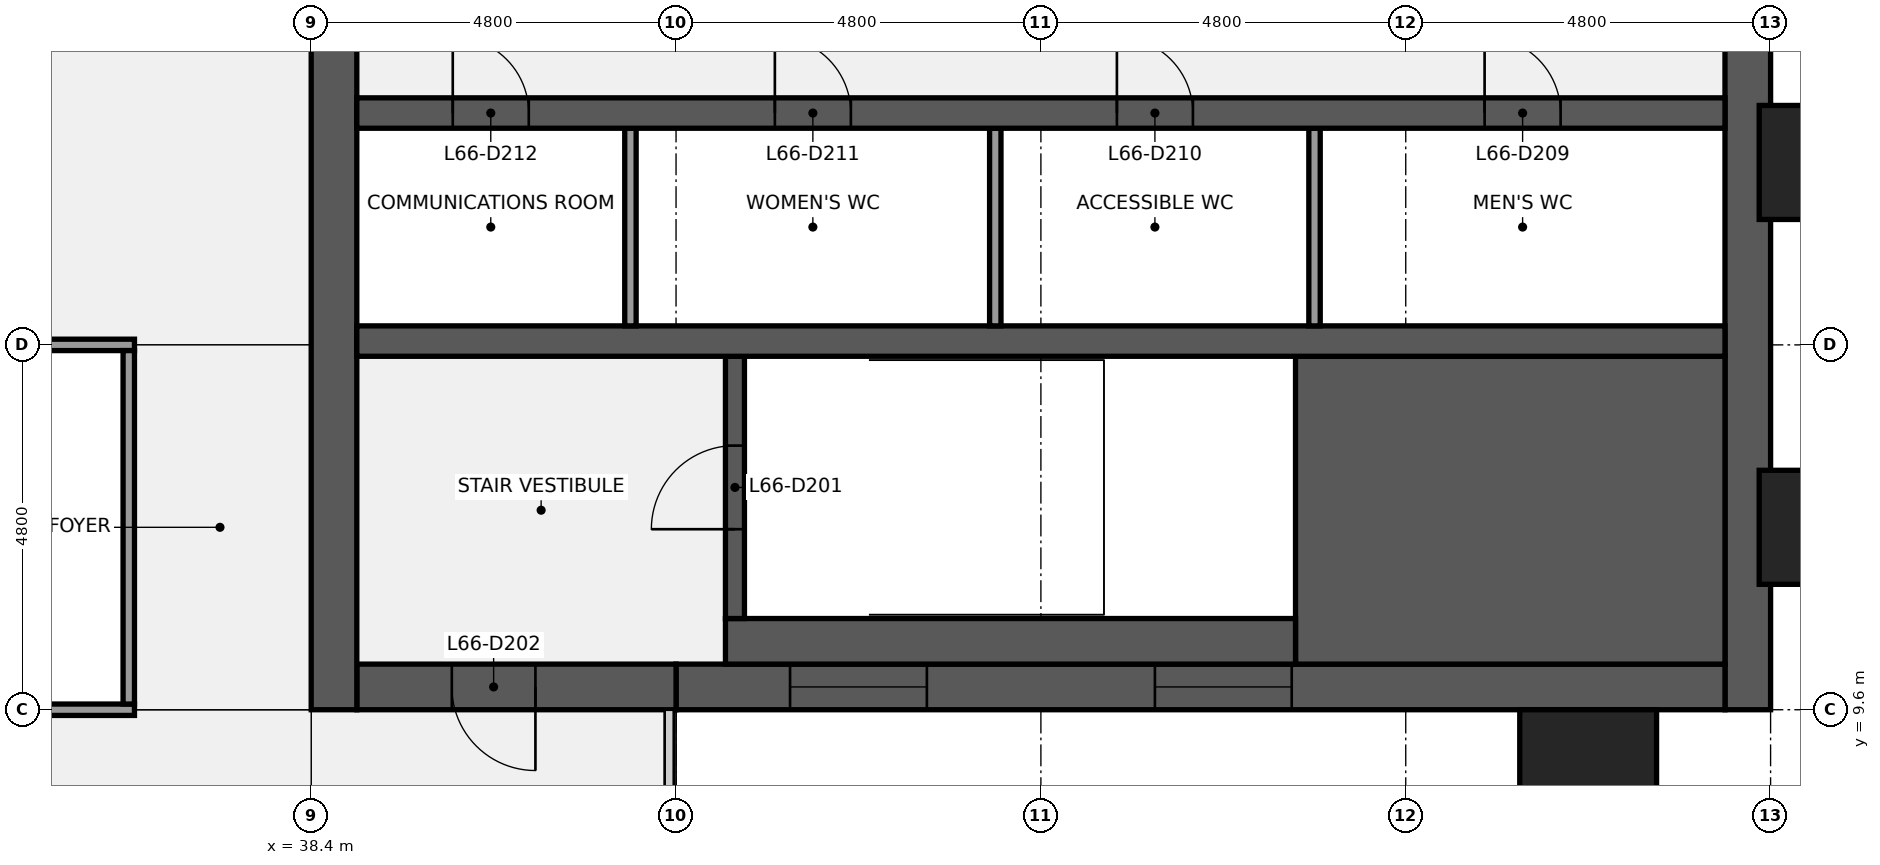
"""IFC4 building model, lengths in metres.
Left out: names, types, materials, properties, quantities, classifications, styles, units other than length and angle.
Written with IfcOpenShell. Run it as: python <this file> out.ifc"""

import sys

from ifc_helpers import new_model, si_unit, direction, frame, frame_2d, origin, origin_2d, place, context, subcontext, project, spatial, rectangle, extrude, element, fill, save


model = new_model("IFC4")
c1 = context("Model", 3, precision=1e-05, world=origin(), true_north=direction((0.0, 1.0)))
c2 = subcontext(c1, "Body", "Model", "MODEL_VIEW")
j1 = project(units=[si_unit("LENGTHUNIT", "METRE"), si_unit("PLANEANGLEUNIT", "RADIAN")], contexts=[c1])
p1 = place(None, origin())
s1 = spatial("IfcSite", under=j1, at=p1, CompositionType="ELEMENT")
p2 = place(p1, origin())
s2 = spatial("IfcBuilding", under=s1, at=p2, CompositionType="ELEMENT")
p3 = place(p2, frame((0.0, 0.0, 302.3)))
s3 = spatial("IfcBuildingStorey", under=s2, at=p3, CompositionType="ELEMENT", Elevation=302.3)
p4 = place(p3, frame((57.3, 38.4, 0.0), z_axis=(0.0, 0.0, 1.0), x_axis=(0.0, -1.0, 0.0)))
e1 = element("IfcWall", 1, at=p4, inside=s3, PredefinedType="SHEAR", context=c2, shape_type="SweptSolid", body=[
    extrude(rectangle(XDim=28.8, YDim=0.6, at=frame_2d((14.4, 0.0))), origin(), (0.0, 0.0, 1.0), 3.84),
])
p5 = place(p4, frame((18.45, 0.0, 0.9)))
e2 = element("IfcOpeningElement", 2, at=p5, cuts=e1, PredefinedType="OPENING", context=c2, shape_type="SweptSolid", body=[
    extrude(rectangle(XDim=1.5, YDim=1.5, at=frame_2d((0.75, 0.75))), frame((0.0, 0.31, 0.0), z_axis=(0.0, -1.0, 0.0), x_axis=(1.0, 0.0, 0.0)), (0.0, 0.0, 1.0), 0.62),
])
p6 = place(p4, frame((8.85, 0.0, 0.9)))
e3 = element("IfcOpeningElement", 3, at=p6, cuts=e1, PredefinedType="OPENING", context=c2, shape_type="SweptSolid", body=[
    extrude(rectangle(XDim=1.5, YDim=1.5, at=frame_2d((0.75, 0.75))), frame((0.0, 0.31, 0.0), z_axis=(0.0, -1.0, 0.0), x_axis=(1.0, 0.0, 0.0)), (0.0, 0.0, 1.0), 0.62),
])
p7 = place(p3, frame((57.0, 9.9, 0.0), z_axis=(0.0, 0.0, 1.0), x_axis=(-1.0, 0.0, 0.0)))
e4 = element("IfcWall", 4, at=p7, inside=s3, PredefinedType="SHEAR", context=c2, shape_type="SweptSolid", body=[
    extrude(rectangle(XDim=13.8, YDim=0.6, at=frame_2d((6.9, 0.0))), origin(), (0.0, 0.0, 1.0), 3.84),
])
p8 = place(p7, frame((5.7, 0.0, 0.9)))
e5 = element("IfcOpeningElement", 5, at=p8, cuts=e4, PredefinedType="OPENING", context=c2, shape_type="SweptSolid", body=[
    extrude(rectangle(XDim=1.8, YDim=1.5, at=frame_2d((0.9, 0.75))), frame((0.0, 0.31, 0.0), z_axis=(0.0, -1.0, 0.0), x_axis=(1.0, 0.0, 0.0)), (0.0, 0.0, 1.0), 0.62),
])
p9 = place(p7, frame((10.5, 0.0, 0.9)))
e6 = element("IfcOpeningElement", 6, at=p9, cuts=e4, PredefinedType="OPENING", context=c2, shape_type="SweptSolid", body=[
    extrude(rectangle(XDim=1.8, YDim=1.5, at=frame_2d((0.9, 0.75))), frame((0.0, 0.31, 0.0), z_axis=(0.0, -1.0, 0.0), x_axis=(1.0, 0.0, 0.0)), (0.0, 0.0, 1.0), 0.62),
])
p10 = place(p3, frame((43.2, 9.9, 0.0), z_axis=(0.0, 0.0, 1.0), x_axis=(-1.0, 0.0, 0.0)))
e7 = element("IfcWall", 7, at=p10, inside=s3, PredefinedType="SHEAR", context=c2, shape_type="SweptSolid", body=[
    extrude(rectangle(XDim=4.2, YDim=0.6, at=frame_2d((2.1, 0.0))), origin(), (0.0, 0.0, 1.0), 3.84),
])
p11 = place(p10, frame((1.85, 0.0, 0.0)))
e8 = element("IfcOpeningElement", 8, at=p11, cuts=e7, PredefinedType="OPENING", context=c2, shape_type="SweptSolid", body=[
    extrude(rectangle(XDim=1.1, YDim=2.1, at=frame_2d((0.55, 1.05))), frame((0.0, 0.31, 0.0), z_axis=(0.0, -1.0, 0.0), x_axis=(1.0, 0.0, 0.0)), (0.0, 0.0, 1.0), 0.62),
])
p12 = place(p3, frame((38.7, 9.6, 0.0), z_axis=(0.0, 0.0, 1.0), x_axis=(0.0, 1.0, 0.0)))
e9 = element("IfcWall", 9, at=p12, inside=s3, PredefinedType="SHEAR", context=c2, shape_type="SweptSolid", body=[
    extrude(rectangle(XDim=28.8, YDim=0.6, at=frame_2d((14.4, 0.0))), origin(), (0.0, 0.0, 1.0), 3.84),
])
p13 = place(p12, frame((8.7, 0.0, 0.0)))
e10 = element("IfcOpeningElement", 10, at=p13, cuts=e9, PredefinedType="OPENING", context=c2, shape_type="SweptSolid", body=[
    extrude(rectangle(XDim=1.8, YDim=2.1, at=frame_2d((0.9, 1.05))), frame((0.0, 0.31, 0.0), z_axis=(0.0, -1.0, 0.0), x_axis=(1.0, 0.0, 0.0)), (0.0, 0.0, 1.0), 0.62),
])
p14 = place(p12, frame((18.3, 0.0, 0.0)))
e11 = element("IfcOpeningElement", 11, at=p14, cuts=e9, PredefinedType="OPENING", context=c2, shape_type="SweptSolid", body=[
    extrude(rectangle(XDim=1.8, YDim=2.1, at=frame_2d((0.9, 1.05))), frame((0.0, 0.31, 0.0), z_axis=(0.0, -1.0, 0.0), x_axis=(1.0, 0.0, 0.0)), (0.0, 0.0, 1.0), 0.62),
])
p15 = place(p3, frame((51.35, 12.225, 0.0), z_axis=(0.0, 0.0, 1.0), x_axis=(1.0, 0.0, 0.0)))
e12 = element("IfcWall", 12, at=p15, inside=s3, PredefinedType="SHEAR", context=c2, shape_type="SweptSolid", body=[
    extrude(rectangle(XDim=5.65, YDim=4.05, at=frame_2d((2.825, 0.0))), origin(), (0.0, 0.0, 1.0), 3.84),
])
p16 = place(p3, frame((43.85, 10.5, 0.0), z_axis=(0.0, 0.0, 1.0), x_axis=(1.0, 0.0, 0.0)))
e13 = element("IfcWall", 13, at=p16, inside=s3, PredefinedType="SHEAR", context=c2, shape_type="SweptSolid", body=[
    extrude(rectangle(XDim=7.5, YDim=0.6, at=frame_2d((3.75, 0.0))), origin(), (0.0, 0.0, 1.0), 3.84),
])
p17 = place(p3, frame((43.975, 10.8, 0.0), z_axis=(0.0, 0.0, 1.0), x_axis=(0.0, 1.0, 0.0)))
e14 = element("IfcWall", 14, at=p17, inside=s3, PredefinedType="SHEAR", context=c2, shape_type="SweptSolid", body=[
    extrude(rectangle(XDim=3.45, YDim=0.25, at=frame_2d((1.725, 0.0))), origin(), (0.0, 0.0, 1.0), 3.84),
])
p18 = place(p17, frame((1.175, 0.0, 0.0)))
e15 = element("IfcOpeningElement", 15, at=p18, cuts=e14, PredefinedType="OPENING", context=c2, shape_type="SweptSolid", body=[
    extrude(rectangle(XDim=1.1, YDim=2.1, at=frame_2d((0.55, 1.05))), frame((0.0, 0.135, 0.0), z_axis=(0.0, -1.0, 0.0), x_axis=(1.0, 0.0, 0.0)), (0.0, 0.0, 1.0), 0.27),
])
p19 = place(p3, frame((39.0, 14.45, 0.0), z_axis=(0.0, 0.0, 1.0), x_axis=(1.0, 0.0, 0.0)))
e16 = element("IfcWall", 16, at=p19, inside=s3, PredefinedType="SHEAR", context=c2, shape_type="SweptSolid", body=[
    extrude(rectangle(XDim=18.0, YDim=0.4, at=frame_2d((9.0, 0.0))), origin(), (0.0, 0.0, 1.0), 3.84),
])
for number, where, z_axis, x_axis in (
    (17, (51.6, 14.65, 0.0), (0.0, 0.0, 1.0), (0.0, 1.0, 0.0)),
    (18, (47.4, 14.65, 0.0), (0.0, 0.0, 1.0), (0.0, 1.0, 0.0)),
    (19, (42.6, 14.65, 0.0), (0.0, 0.0, 1.0), (0.0, 1.0, 0.0)),
):
    element("IfcWall", number, at=place(p3, frame(where, z_axis=z_axis, x_axis=x_axis)), inside=s3, PredefinedType="PARTITIONING", context=c2, shape_type="SweptSolid", body=[
        extrude(rectangle(XDim=2.6, YDim=0.15, at=frame_2d((1.3, 0.0))), origin(), (0.0, 0.0, 1.0), 3.84),
    ])
p20 = place(p3, frame((39.0, 17.45, 0.0), z_axis=(0.0, 0.0, 1.0), x_axis=(1.0, 0.0, 0.0)))
e20 = element("IfcWall", 20, at=p20, inside=s3, PredefinedType="SHEAR", context=c2, shape_type="SweptSolid", body=[
    extrude(rectangle(XDim=18.0, YDim=0.4, at=frame_2d((9.0, 0.0))), origin(), (0.0, 0.0, 1.0), 3.84),
])
p21 = place(p20, frame((14.837, 0.0, 0.0)))
e21 = element("IfcOpeningElement", 21, at=p21, cuts=e20, PredefinedType="OPENING", context=c2, shape_type="SweptSolid", body=[
    extrude(rectangle(XDim=1.0, YDim=2.1, at=frame_2d((0.5, 1.05))), frame((0.0, 0.21, 0.0), z_axis=(0.0, -1.0, 0.0), x_axis=(1.0, 0.0, 0.0)), (0.0, 0.0, 1.0), 0.42),
])
p22 = place(p20, frame((10.0, 0.0, 0.0)))
e22 = element("IfcOpeningElement", 22, at=p22, cuts=e20, PredefinedType="OPENING", context=c2, shape_type="SweptSolid", body=[
    extrude(rectangle(XDim=1.0, YDim=2.1, at=frame_2d((0.5, 1.05))), frame((0.0, 0.21, 0.0), z_axis=(0.0, -1.0, 0.0), x_axis=(1.0, 0.0, 0.0)), (0.0, 0.0, 1.0), 0.42),
])
p23 = place(p20, frame((5.5, 0.0, 0.0)))
e23 = element("IfcOpeningElement", 23, at=p23, cuts=e20, PredefinedType="OPENING", context=c2, shape_type="SweptSolid", body=[
    extrude(rectangle(XDim=1.0, YDim=2.1, at=frame_2d((0.5, 1.05))), frame((0.0, 0.21, 0.0), z_axis=(0.0, -1.0, 0.0), x_axis=(1.0, 0.0, 0.0)), (0.0, 0.0, 1.0), 0.42),
])
p24 = place(p20, frame((1.262, 0.0, 0.0)))
e24 = element("IfcOpeningElement", 24, at=p24, cuts=e20, PredefinedType="OPENING", context=c2, shape_type="SweptSolid", body=[
    extrude(rectangle(XDim=1.0, YDim=2.1, at=frame_2d((0.5, 1.05))), frame((0.0, 0.21, 0.0), z_axis=(0.0, -1.0, 0.0), x_axis=(1.0, 0.0, 0.0)), (0.0, 0.0, 1.0), 0.42),
])
p25 = place(p3, frame((21.525, 9.6, 0.0), z_axis=(0.0, 0.0, 1.0), x_axis=(1.0, 0.0, 0.0)))
e25 = element("IfcWall", 25, at=p25, inside=s3, PredefinedType="PARTITIONING", context=c2, shape_type="SweptSolid", body=[
    extrude(rectangle(XDim=14.55, YDim=0.15, at=frame_2d((7.275, 0.0))), origin(), (0.0, 0.0, 1.0), 2.87),
])
p26 = place(p25, frame((3.175, 0.0, 0.0)))
e26 = element("IfcOpeningElement", 26, at=p26, cuts=e25, PredefinedType="OPENING", context=c2, shape_type="SweptSolid", body=[
    extrude(rectangle(XDim=1.0, YDim=2.1, at=frame_2d((0.5, 1.05))), frame((0.0, 0.085, 0.0), z_axis=(0.0, -1.0, 0.0), x_axis=(1.0, 0.0, 0.0)), (0.0, 0.0, 1.0), 0.17),
])
p27 = place(p25, frame((10.375, 0.0, 0.0)))
e27 = element("IfcOpeningElement", 27, at=p27, cuts=e25, PredefinedType="OPENING", context=c2, shape_type="SweptSolid", body=[
    extrude(rectangle(XDim=1.0, YDim=2.1, at=frame_2d((0.5, 1.05))), frame((0.0, 0.085, 0.0), z_axis=(0.0, -1.0, 0.0), x_axis=(1.0, 0.0, 0.0)), (0.0, 0.0, 1.0), 0.17),
])
p28 = place(p3, frame((31.275, 14.4, 0.0), z_axis=(0.0, 0.0, 1.0), x_axis=(1.0, 0.0, 0.0)))
e28 = element("IfcWall", 28, at=p28, inside=s3, PredefinedType="PARTITIONING", context=c2, shape_type="SweptSolid", body=[
    extrude(rectangle(XDim=4.8, YDim=0.15, at=frame_2d((2.4, 0.0))), origin(), (0.0, 0.0, 1.0), 2.87),
])
p29 = place(p3, frame((36.0, 9.675, 0.0), z_axis=(0.0, 0.0, 1.0), x_axis=(0.0, 1.0, 0.0)))
e29 = element("IfcWall", 29, at=p29, inside=s3, PredefinedType="PARTITIONING", context=c2, shape_type="SweptSolid", body=[
    extrude(rectangle(XDim=4.65, YDim=0.15, at=frame_2d((2.325, 0.0))), origin(), (0.0, 0.0, 1.0), 2.87),
])
for number, where, z_axis, x_axis in (
    (30, (55.2, 8.85, 0.0), (0.0, 0.0, 1.0), (1.0, 0.0, 0.0)),
    (31, (58.35, 12.0, 0.0), (0.0, 0.0, 1.0), (0.0, 1.0, 0.0)),
    (32, (58.35, 16.8, 0.0), (0.0, 0.0, 1.0), (0.0, 1.0, 0.0)),
):
    element("IfcColumn", number, at=place(p3, frame(where, z_axis=z_axis, x_axis=x_axis)), inside=s3, PredefinedType="PILASTER", context=c2, shape_type="SweptSolid", body=[
        extrude(rectangle(XDim=1.8, YDim=1.5, at=origin_2d()), origin(), (0.0, 0.0, 1.0), 4.0),
    ])
p30 = place(p18, origin())
e33 = element("IfcDoor", 33, at=p30, inside=s3, OperationType="SINGLE_SWING_LEFT", PredefinedType="DOOR", context=c2, shape_type="SweptSolid", body=[
    extrude(rectangle(XDim=1.1, YDim=2.1, at=frame_2d((0.55, 1.05))), frame((0.0, 0.025, 0.0), z_axis=(0.0, -1.0, 0.0), x_axis=(1.0, 0.0, 0.0)), (0.0, 0.0, 1.0), 0.05),
])
fill(e15, e33)
p31 = place(p11, origin())
e34 = element("IfcDoor", 34, at=p31, inside=s3, OperationType="SINGLE_SWING_LEFT", PredefinedType="DOOR", context=c2, shape_type="SweptSolid", body=[
    extrude(rectangle(XDim=1.1, YDim=2.1, at=frame_2d((0.55, 1.05))), frame((0.0, 0.025, 0.0), z_axis=(0.0, -1.0, 0.0), x_axis=(1.0, 0.0, 0.0)), (0.0, 0.0, 1.0), 0.05),
])
fill(e8, e34)
p32 = place(p21, origin())
e35 = element("IfcDoor", 35, at=p32, inside=s3, OperationType="SINGLE_SWING_LEFT", PredefinedType="DOOR", context=c2, shape_type="SweptSolid", body=[
    extrude(rectangle(XDim=1.0, YDim=2.1, at=frame_2d((0.5, 1.05))), frame((0.0, 0.025, 0.0), z_axis=(0.0, -1.0, 0.0), x_axis=(1.0, 0.0, 0.0)), (0.0, 0.0, 1.0), 0.05),
])
fill(e21, e35)
p33 = place(p22, origin())
e36 = element("IfcDoor", 36, at=p33, inside=s3, OperationType="SINGLE_SWING_LEFT", PredefinedType="DOOR", context=c2, shape_type="SweptSolid", body=[
    extrude(rectangle(XDim=1.0, YDim=2.1, at=frame_2d((0.5, 1.05))), frame((0.0, 0.025, 0.0), z_axis=(0.0, -1.0, 0.0), x_axis=(1.0, 0.0, 0.0)), (0.0, 0.0, 1.0), 0.05),
])
fill(e22, e36)
p34 = place(p23, origin())
e37 = element("IfcDoor", 37, at=p34, inside=s3, OperationType="SINGLE_SWING_LEFT", PredefinedType="DOOR", context=c2, shape_type="SweptSolid", body=[
    extrude(rectangle(XDim=1.0, YDim=2.1, at=frame_2d((0.5, 1.05))), frame((0.0, 0.025, 0.0), z_axis=(0.0, -1.0, 0.0), x_axis=(1.0, 0.0, 0.0)), (0.0, 0.0, 1.0), 0.05),
])
fill(e23, e37)
p35 = place(p24, origin())
e38 = element("IfcDoor", 38, at=p35, inside=s3, OperationType="SINGLE_SWING_LEFT", PredefinedType="DOOR", context=c2, shape_type="SweptSolid", body=[
    extrude(rectangle(XDim=1.0, YDim=2.1, at=frame_2d((0.5, 1.05))), frame((0.0, 0.025, 0.0), z_axis=(0.0, -1.0, 0.0), x_axis=(1.0, 0.0, 0.0)), (0.0, 0.0, 1.0), 0.05),
])
fill(e24, e38)
p36 = place(p8, origin())
e39 = element("IfcWindow", 39, at=p36, inside=s3, PartitioningType="SINGLE_PANEL", PredefinedType="WINDOW", context=c2, shape_type="SweptSolid", body=[
    extrude(rectangle(XDim=1.8, YDim=1.5, at=frame_2d((0.9, 0.75))), frame((0.0, 0.03, 0.0), z_axis=(0.0, -1.0, 0.0), x_axis=(1.0, 0.0, 0.0)), (0.0, 0.0, 1.0), 0.06),
])
fill(e5, e39)
p37 = place(p9, origin())
e40 = element("IfcWindow", 40, at=p37, inside=s3, PartitioningType="SINGLE_PANEL", PredefinedType="WINDOW", context=c2, shape_type="SweptSolid", body=[
    extrude(rectangle(XDim=1.8, YDim=1.5, at=frame_2d((0.9, 0.75))), frame((0.0, 0.03, 0.0), z_axis=(0.0, -1.0, 0.0), x_axis=(1.0, 0.0, 0.0)), (0.0, 0.0, 1.0), 0.06),
])
fill(e6, e40)
save(model, sys.argv[1])
